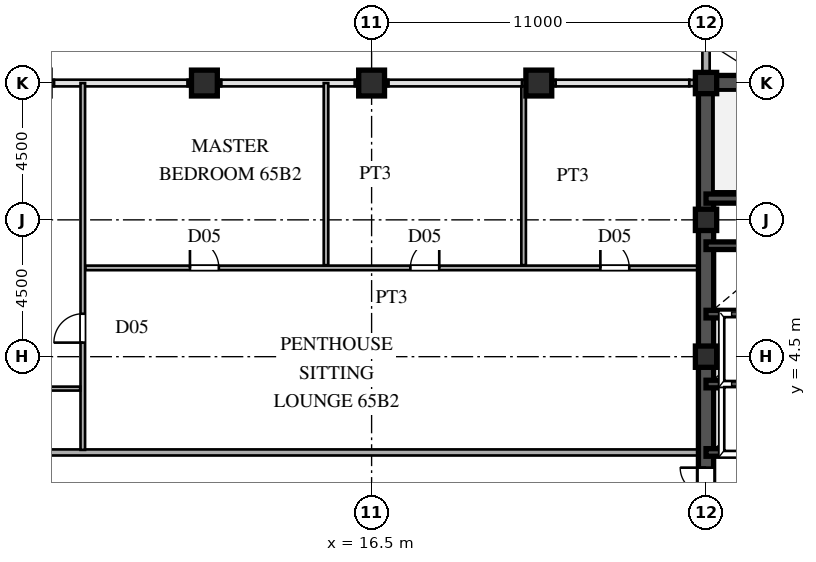
"""IFC4 building model, lengths in metres.
Left out: names, types, materials, properties, quantities, classifications, styles, units other than length and angle.
Written with IfcOpenShell. Run it as: python <this file> out.ifc"""

import sys

from ifc_helpers import new_model, si_unit, direction, frame, frame_2d, origin, origin_2d, place, context, subcontext, project, spatial, rectangle, hollow_rectangle, extrude, source, transform, mapped, element, fill, save


model = new_model("IFC4")
c1 = context("Model", 3, precision=1e-05, world=origin(), true_north=direction((0.0, 1.0)))
c2 = subcontext(c1, "Body", "Model", "MODEL_VIEW")
j1 = project(units=[si_unit("LENGTHUNIT", "METRE"), si_unit("PLANEANGLEUNIT", "RADIAN")], contexts=[c1])
p1 = place(None, origin())
s1 = spatial("IfcSite", under=j1, at=p1, CompositionType="ELEMENT")
p2 = place(p1, origin())
s2 = spatial("IfcBuilding", under=s1, at=p2, CompositionType="ELEMENT")
p3 = place(p2, frame((0.0, 0.0, 246.9)))
s3 = spatial("IfcBuildingStorey", under=s2, at=p3, CompositionType="ELEMENT", Elevation=246.9)
m1 = source(origin(), c2, "Body", "SweptSolid", [
    extrude(hollow_rectangle(XDim=0.7, YDim=0.7, WallThickness=0.03, at=origin_2d()), origin(), (0.0, 0.0, 1.0), 3.75),
])
for number, where, z_axis, x_axis in (
    (1, (27.5, 4.5, 0.0), (0.0, 0.0, 1.0), (1.0, 0.0, 0.0)),
    (2, (27.5, 9.0, 0.0), (0.0, 0.0, 1.0), (1.0, 0.0, 0.0)),
    (3, (27.5, 13.5, 0.0), (0.0, 0.0, 1.0), (1.0, 0.0, 0.0)),
):
    element("IfcColumn", number, at=place(p3, frame(where, z_axis=z_axis, x_axis=x_axis)), inside=s3, PredefinedType="COLUMN", context=c2, shape_type="MappedRepresentation", body=[
        mapped(m1, transform((0.0, 0.0, 0.0), scale=1.0)),
    ])
m2 = source(origin(), c2, "Body", "SweptSolid", [
    extrude(hollow_rectangle(XDim=0.85, YDim=0.85, WallThickness=0.036, at=origin_2d()), origin(), (0.0, 0.0, 1.0), 3.75),
])
for number, where, z_axis, x_axis in (
    (4, (11.0, 13.5, 0.0), (0.0, 0.0, 1.0), (1.0, 0.0, 0.0)),
    (5, (16.5, 13.5, 0.0), (0.0, 0.0, 1.0), (1.0, 0.0, 0.0)),
    (6, (22.0, 13.5, 0.0), (0.0, 0.0, 1.0), (1.0, 0.0, 0.0)),
):
    element("IfcColumn", number, at=place(p3, frame(where, z_axis=z_axis, x_axis=x_axis)), inside=s3, PredefinedType="COLUMN", context=c2, shape_type="MappedRepresentation", body=[
        mapped(m2, transform((0.0, 0.0, 0.0), scale=1.0)),
    ])
p4 = place(p3, frame((27.5, 13.755, 0.0), z_axis=(0.0, 0.0, 1.0), x_axis=(0.0, 1.0, 0.0)))
e7 = element("IfcWall", 7, at=p4, inside=s3, PredefinedType="SOLIDWALL", context=c2, shape_type="SweptSolid", body=[
    extrude(rectangle(XDim=0.62, YDim=0.24, at=frame_2d((0.31, 0.0))), origin(), (0.0, 0.0, 1.0), 3.03),
])
p5 = place(p3, frame((27.5, 14.375, 0.0), z_axis=(0.0, 0.0, 1.0), x_axis=(0.0, 1.0, 0.0)))
e8 = element("IfcWall", 8, at=p5, inside=s3, PredefinedType="SOLIDWALL", context=c2, shape_type="SweptSolid", body=[
    extrude(rectangle(XDim=1.605, YDim=0.24, at=frame_2d((0.803, 0.0))), origin(), (0.0, 0.0, 1.0), 3.53),
])
for number, where, z_axis, x_axis in (
    (9, (4.95, 13.5, 0.0), (0.0, 0.0, 1.0), (1.0, 0.0, 0.0)),
    (10, (10.45, 13.5, 0.0), (0.0, 0.0, 1.0), (1.0, 0.0, 0.0)),
    (11, (15.95, 13.5, 0.0), (0.0, 0.0, 1.0), (1.0, 0.0, 0.0)),
    (12, (21.45, 13.5, 0.0), (0.0, 0.0, 1.0), (1.0, 0.0, 0.0)),
):
    element("IfcWall", number, at=place(p3, frame(where, z_axis=z_axis, x_axis=x_axis)), inside=s3, PredefinedType="SOLIDWALL", context=c2, shape_type="SweptSolid", body=[
        extrude(rectangle(XDim=1.1, YDim=0.21, at=frame_2d((0.55, 0.0))), origin(), (0.0, 0.0, 1.0), 3.03),
    ])
p6 = place(p3, frame((26.95, 13.5, 0.0), z_axis=(0.0, 0.0, 1.0), x_axis=(1.0, 0.0, 0.0)))
e13 = element("IfcWall", 13, at=p6, inside=s3, PredefinedType="SOLIDWALL", context=c2, shape_type="SweptSolid", body=[
    extrude(rectangle(XDim=0.54, YDim=0.21, at=frame_2d((0.27, 0.0))), origin(), (0.0, 0.0, 1.0), 3.03),
])
p7 = place(p3, frame((27.5, 1.3, 0.0), z_axis=(0.0, 0.0, 1.0), x_axis=(0.0, 1.0, 0.0)))
e14 = element("IfcWall", 14, at=p7, inside=s3, PredefinedType="SHEAR", context=c2, shape_type="SweptSolid", body=[
    extrude(rectangle(XDim=12.2, YDim=0.5, at=frame_2d((6.1, 0.0))), origin(), (0.0, 0.0, 1.0), 3.53),
])
p8 = place(p3, frame((27.5, -1.3, 0.0), z_axis=(0.0, 0.0, 1.0), x_axis=(0.0, 1.0, 0.0)))
e15 = element("IfcWall", 15, at=p8, inside=s3, PredefinedType="SHEAR", context=c2, shape_type="SweptSolid", body=[
    extrude(rectangle(XDim=2.6, YDim=0.5, at=frame_2d((1.3, 0.0))), origin(), (0.0, 0.0, 1.0), 3.53),
])
p9 = place(p8, frame((0.45, 0.0, 0.0)))
e16 = element("IfcOpeningElement", 16, at=p9, cuts=e15, PredefinedType="OPENING", context=c2, shape_type="SweptSolid", body=[
    extrude(rectangle(XDim=1.7, YDim=2.35, at=frame_2d((0.85, 1.175))), frame((0.0, 0.26, 0.0), z_axis=(0.0, -1.0, 0.0), x_axis=(1.0, 0.0, 0.0)), (0.0, 0.0, 1.0), 0.52),
])
p10 = place(p3, frame((27.5, 13.5, 0.0), z_axis=(0.0, 0.0, 1.0), x_axis=(1.0, 0.0, 0.0)))
e17 = element("IfcWall", 17, at=p10, inside=s3, PredefinedType="SHEAR", context=c2, shape_type="SweptSolid", body=[
    extrude(rectangle(XDim=9.0, YDim=0.5, at=frame_2d((4.5, 0.0))), origin(), (0.0, 0.0, 1.0), 3.53),
])
p11 = place(p3, frame((27.5, 9.7, 0.0), z_axis=(0.0, 0.0, 1.0), x_axis=(1.0, 0.0, 0.0)))
e18 = element("IfcWall", 18, at=p11, inside=s3, PredefinedType="SHEAR", context=c2, shape_type="SweptSolid", body=[
    extrude(rectangle(XDim=9.0, YDim=0.3, at=frame_2d((4.5, 0.0))), origin(), (0.0, 0.0, 1.0), 3.53),
])
p12 = place(p11, frame((7.3, 0.0, 0.0)))
e19 = element("IfcOpeningElement", 19, at=p12, cuts=e18, PredefinedType="OPENING", context=c2, shape_type="SweptSolid", body=[
    extrude(rectangle(XDim=1.1, YDim=2.2, at=frame_2d((0.55, 1.1))), frame((0.0, 0.16, 0.0), z_axis=(0.0, -1.0, 0.0), x_axis=(1.0, 0.0, 0.0)), (0.0, 0.0, 1.0), 0.32),
])
for number, where, z_axis, x_axis in (
    (20, (27.5, 1.35, 0.0), (0.0, 0.0, 1.0), (1.0, 0.0, 0.0)),
    (21, (27.5, 3.6, 0.0), (0.0, 0.0, 1.0), (1.0, 0.0, 0.0)),
    (22, (27.5, 5.9, 0.0), (0.0, 0.0, 1.0), (1.0, 0.0, 0.0)),
    (23, (27.5, 8.15, 0.0), (0.0, 0.0, 1.0), (1.0, 0.0, 0.0)),
):
    element("IfcWall", number, at=place(p3, frame(where, z_axis=z_axis, x_axis=x_axis)), inside=s3, PredefinedType="SHEAR", context=c2, shape_type="SweptSolid", body=[
        extrude(rectangle(XDim=2.8, YDim=0.25, at=frame_2d((1.4, 0.0))), origin(), (0.0, 0.0, 1.0), 3.53),
    ])
p13 = place(p3, frame((-27.245, 1.35, 0.0), z_axis=(0.0, 0.0, 1.0), x_axis=(1.0, 0.0, 0.0)))
e24 = element("IfcWall", 24, at=p13, inside=s3, PredefinedType="PARTITIONING", context=c2, shape_type="SweptSolid", body=[
    extrude(rectangle(XDim=54.49, YDim=0.2, at=frame_2d((27.245, 0.0))), origin(), (0.0, 0.0, 1.0), 3.53),
])
p14 = place(p13, frame((24.97, 0.0, 0.0)))
e25 = element("IfcOpeningElement", 25, at=p14, cuts=e24, PredefinedType="OPENING", context=c2, shape_type="SweptSolid", body=[
    extrude(rectangle(XDim=1.05, YDim=2.25, at=frame_2d((0.525, 1.125))), frame((0.0, 0.11, 0.0), z_axis=(0.0, -1.0, 0.0), x_axis=(1.0, 0.0, 0.0)), (0.0, 0.0, 1.0), 0.22),
])
p15 = place(p3, frame((1.585, 3.45, 0.0), z_axis=(0.0, 0.0, 1.0), x_axis=(1.0, 0.0, 0.0)))
e26 = element("IfcWall", 26, at=p15, inside=s3, PredefinedType="PARTITIONING", context=c2, shape_type="SweptSolid", body=[
    extrude(rectangle(XDim=5.33, YDim=0.13, at=frame_2d((2.665, 0.0))), origin(), (0.0, 0.0, 1.0), 3.53),
])
p16 = place(p3, frame((7.085, 7.42, 0.0), z_axis=(0.0, 0.0, 1.0), x_axis=(1.0, 0.0, 0.0)))
e27 = element("IfcWall", 27, at=p16, inside=s3, PredefinedType="PARTITIONING", context=c2, shape_type="SweptSolid", body=[
    extrude(rectangle(XDim=20.16, YDim=0.15, at=frame_2d((10.08, 0.0))), origin(), (0.0, 0.0, 1.0), 3.53),
])
p17 = place(p16, frame((3.44, 0.0, 0.0)))
e28 = element("IfcOpeningElement", 28, at=p17, cuts=e27, PredefinedType="OPENING", context=c2, shape_type="SweptSolid", body=[
    extrude(rectangle(XDim=0.95, YDim=2.15, at=frame_2d((0.475, 1.075))), frame((0.0, 0.085, 0.0), z_axis=(0.0, -1.0, 0.0), x_axis=(1.0, 0.0, 0.0)), (0.0, 0.0, 1.0), 0.17),
])
p18 = place(p16, frame((10.69, 0.0, 0.0)))
e29 = element("IfcOpeningElement", 29, at=p18, cuts=e27, PredefinedType="OPENING", context=c2, shape_type="SweptSolid", body=[
    extrude(rectangle(XDim=0.95, YDim=2.15, at=frame_2d((0.475, 1.075))), frame((0.0, 0.085, 0.0), z_axis=(0.0, -1.0, 0.0), x_axis=(1.0, 0.0, 0.0)), (0.0, 0.0, 1.0), 0.17),
])
p19 = place(p16, frame((16.94, 0.0, 0.0)))
e30 = element("IfcOpeningElement", 30, at=p19, cuts=e27, PredefinedType="OPENING", context=c2, shape_type="SweptSolid", body=[
    extrude(rectangle(XDim=0.95, YDim=2.15, at=frame_2d((0.475, 1.075))), frame((0.0, 0.085, 0.0), z_axis=(0.0, -1.0, 0.0), x_axis=(1.0, 0.0, 0.0)), (0.0, 0.0, 1.0), 0.17),
])
p20 = place(p3, frame((7.0, 1.435, 0.0), z_axis=(0.0, 0.0, 1.0), x_axis=(0.0, 1.0, 0.0)))
e31 = element("IfcWall", 31, at=p20, inside=s3, PredefinedType="PARTITIONING", context=c2, shape_type="SweptSolid", body=[
    extrude(rectangle(XDim=12.065, YDim=0.15, at=frame_2d((6.032, 0.0))), origin(), (0.0, 0.0, 1.0), 3.53),
])
p21 = place(p20, frame((3.528, 0.0, 0.0)))
e32 = element("IfcOpeningElement", 32, at=p21, cuts=e31, PredefinedType="OPENING", context=c2, shape_type="SweptSolid", body=[
    extrude(rectangle(XDim=0.95, YDim=2.15, at=frame_2d((0.475, 1.075))), frame((0.0, 0.085, 0.0), z_axis=(0.0, -1.0, 0.0), x_axis=(1.0, 0.0, 0.0)), (0.0, 0.0, 1.0), 0.17),
])
p22 = place(p3, frame((15.0, 7.51, 0.0), z_axis=(0.0, 0.0, 1.0), x_axis=(0.0, 1.0, 0.0)))
e33 = element("IfcWall", 33, at=p22, inside=s3, PredefinedType="PARTITIONING", context=c2, shape_type="SweptSolid", body=[
    extrude(rectangle(XDim=5.99, YDim=0.15, at=frame_2d((2.995, 0.0))), origin(), (0.0, 0.0, 1.0), 3.53),
])
p23 = place(p3, frame((21.5, 7.51, 0.0), z_axis=(0.0, 0.0, 1.0), x_axis=(0.0, 1.0, 0.0)))
e34 = element("IfcWall", 34, at=p23, inside=s3, PredefinedType="PARTITIONING", context=c2, shape_type="SweptSolid", body=[
    extrude(rectangle(XDim=5.88, YDim=0.15, at=frame_2d((2.94, 0.0))), origin(), (0.0, 0.0, 1.0), 3.53),
])
m3 = source(origin(), c2, "Body", "SweptSolid", [
    extrude(rectangle(XDim=1.7, YDim=2.35, at=frame_2d((0.85, 1.175))), frame((0.0, 0.025, 0.0), z_axis=(0.0, -1.0, 0.0), x_axis=(1.0, 0.0, 0.0)), (0.0, 0.0, 1.0), 0.05),
])
p24 = place(p9, origin())
e35 = element("IfcDoor", 35, at=p24, inside=s3, OperationType="DOUBLE_SWING_LEFT", PredefinedType="DOOR", context=c2, shape_type="MappedRepresentation", body=[
    mapped(m3, transform((0.0, 0.0, 0.0), scale=1.0)),
])
fill(e16, e35)
m4 = source(origin(), c2, "Body", "SweptSolid", [
    extrude(rectangle(XDim=0.95, YDim=2.15, at=frame_2d((0.475, 1.075))), frame((0.0, 0.025, 0.0), z_axis=(0.0, -1.0, 0.0), x_axis=(1.0, 0.0, 0.0)), (0.0, 0.0, 1.0), 0.05),
])
p25 = place(p17, origin())
e36 = element("IfcDoor", 36, at=p25, inside=s3, OperationType="SINGLE_SWING_LEFT", PredefinedType="DOOR", context=c2, shape_type="MappedRepresentation", body=[
    mapped(m4, transform((0.0, 0.0, 0.0), scale=1.0)),
])
fill(e28, e36)
p26 = place(p18, origin())
e37 = element("IfcDoor", 37, at=p26, inside=s3, OperationType="SINGLE_SWING_RIGHT", PredefinedType="DOOR", context=c2, shape_type="MappedRepresentation", body=[
    mapped(m4, transform((0.0, 0.0, 0.0), scale=1.0)),
])
fill(e29, e37)
p27 = place(p19, origin())
e38 = element("IfcDoor", 38, at=p27, inside=s3, OperationType="SINGLE_SWING_LEFT", PredefinedType="DOOR", context=c2, shape_type="MappedRepresentation", body=[
    mapped(m4, transform((0.0, 0.0, 0.0), scale=1.0)),
])
fill(e30, e38)
p28 = place(p21, origin())
e39 = element("IfcDoor", 39, at=p28, inside=s3, OperationType="SINGLE_SWING_LEFT", PredefinedType="DOOR", context=c2, shape_type="MappedRepresentation", body=[
    mapped(m4, transform((0.0, 0.0, 0.0), scale=1.0)),
])
fill(e32, e39)
save(model, sys.argv[1])
